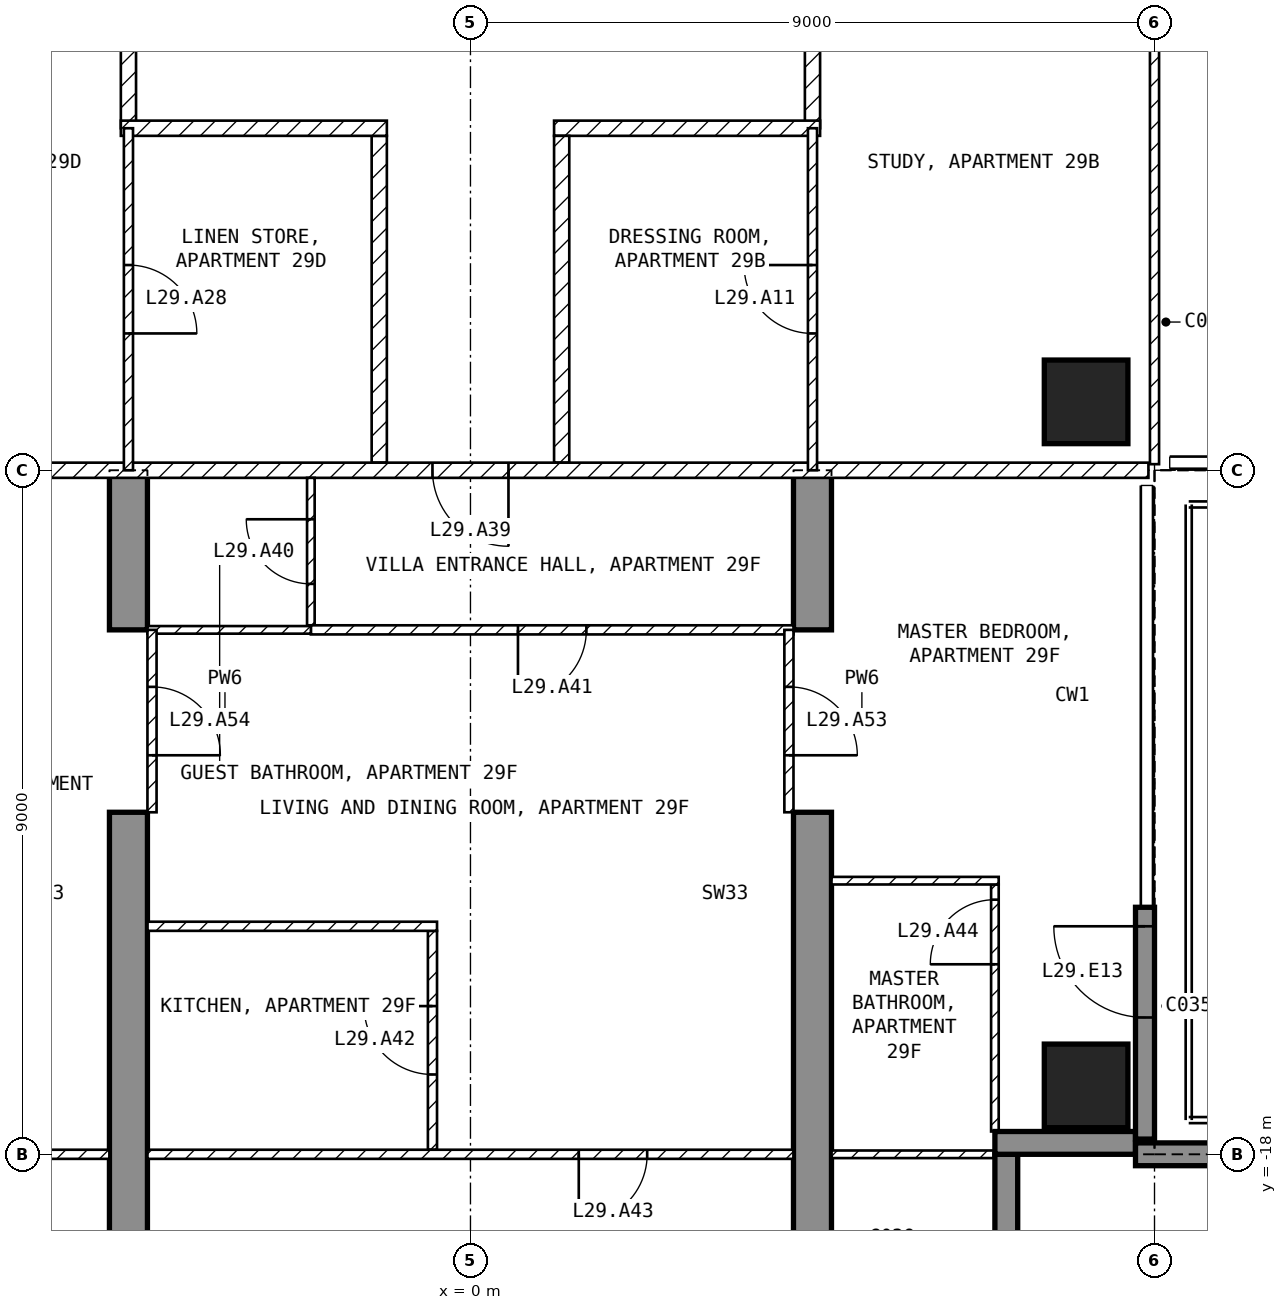
"""IFC4 building model, lengths in metres.
Left out: names, types, materials, properties, quantities, classifications, styles, units other than length and angle.
Written with IfcOpenShell. Run it as: python <this file> out.ifc"""

import sys

from ifc_helpers import new_model, si_unit, direction, frame, frame_2d, origin, origin_2d, place, context, subcontext, project, spatial, polyline, rectangle, outline, extrude, element, fill, save


model = new_model("IFC4")
c1 = context("Model", 3, precision=1e-05, world=origin(), true_north=direction((0.0, 1.0)))
c2 = subcontext(c1, "Body", "Model", "MODEL_VIEW")
j1 = project(units=[si_unit("LENGTHUNIT", "METRE"), si_unit("PLANEANGLEUNIT", "RADIAN")], contexts=[c1])
p1 = place(None, origin())
s1 = spatial("IfcSite", under=j1, at=p1, CompositionType="ELEMENT")
p2 = place(p1, origin())
s2 = spatial("IfcBuilding", under=s1, at=p2, CompositionType="ELEMENT")
p3 = place(p2, frame((0.0, 0.0, 123.4)))
s3 = spatial("IfcBuildingStorey", under=s2, at=p3, CompositionType="ELEMENT", Elevation=123.4)
for number, where, z_axis, x_axis in (
    (1, (8.1, -17.1, -0.25), (0.0, 0.0, 1.0), (1.0, 0.0, 0.0)),
    (2, (8.1, -8.1, -0.25), (0.0, 0.0, 1.0), (1.0, 0.0, 0.0)),
):
    element("IfcColumn", number, at=place(p3, frame(where, z_axis=z_axis, x_axis=x_axis)), inside=s3, PredefinedType="COLUMN", context=c2, shape_type="SweptSolid", body=[
        extrude(rectangle(XDim=1.1, YDim=1.1, at=origin_2d()), origin(), (0.0, 0.0, 1.0), 3.5),
    ])
for number, where, z_axis, x_axis in (
    (3, (-4.75, -20.15, -0.25), (1.0, 0.0, 0.0), (0.0, 1.0, 0.0)),
    (4, (4.25, -20.15, -0.25), (1.0, 0.0, 0.0), (0.0, 1.0, 0.0)),
):
    element("IfcWall", number, at=place(p3, frame(where, z_axis=z_axis, x_axis=x_axis)), inside=s3, PredefinedType="SHEAR", context=c2, shape_type="SweptSolid", body=[
        extrude(outline(polyline([(0.0, 0.0), (6.65, 0.0), (6.65, 2.65), (9.05, 2.65), (9.05, 0.0), (11.15, 0.0), (11.15, 3.5), (0.0, 3.5), (0.0, 0.0)])), origin(), (0.0, 0.0, 1.0), 0.5),
    ])
p4 = place(p3, frame((8.875, -17.8, 0.0), z_axis=(0.0, 0.0, 1.0), x_axis=(0.0, 1.0, 0.0)))
e5 = element("IfcWall", 5, at=p4, inside=s3, PredefinedType="SOLIDWALL", context=c2, shape_type="SweptSolid", body=[
    extrude(rectangle(XDim=3.05, YDim=0.25, at=frame_2d((1.525, 0.0))), origin(), (0.0, 0.0, 1.0), 3.25),
])
p5 = place(p4, frame((1.6, 0.0, 0.0)))
e6 = element("IfcOpeningElement", 6, at=p5, cuts=e5, PredefinedType="OPENING", context=c2, shape_type="SweptSolid", body=[
    extrude(rectangle(XDim=1.2, YDim=2.4, at=frame_2d((0.6, 1.2))), frame((0.0, 0.135, 0.0), z_axis=(0.0, -1.0, 0.0), x_axis=(1.0, 0.0, 0.0)), (0.0, 0.0, 1.0), 0.27),
])
p6 = place(p3, frame((7.05, -19.8, 0.0), z_axis=(0.0, 0.0, 1.0), x_axis=(0.0, 1.0, 0.0)))
e7 = element("IfcWall", 7, at=p6, inside=s3, PredefinedType="SOLIDWALL", context=c2, shape_type="SweptSolid", body=[
    extrude(rectangle(XDim=1.8, YDim=0.3, at=frame_2d((0.9, 0.0))), origin(), (0.0, 0.0, 1.0), 3.25),
])
p7 = place(p3, frame((6.9, -17.85, 0.0), z_axis=(0.0, 0.0, 1.0), x_axis=(1.0, 0.0, 0.0)))
e8 = element("IfcWall", 8, at=p7, inside=s3, PredefinedType="SOLIDWALL", context=c2, shape_type="SweptSolid", body=[
    extrude(rectangle(XDim=1.85, YDim=0.3, at=frame_2d((0.925, 0.0))), origin(), (0.0, 0.0, 1.0), 3.25),
])
p8 = place(p3, frame((8.75, -18.0, 0.0), z_axis=(0.0, 0.0, 1.0), x_axis=(1.0, 0.0, 0.0)))
e9 = element("IfcWall", 9, at=p8, inside=s3, PredefinedType="SOLIDWALL", context=c2, shape_type="SweptSolid", body=[
    extrude(rectangle(XDim=2.99, YDim=0.3, at=frame_2d((1.495, 0.0))), origin(), (0.0, 0.0, 1.0), 3.25),
])
p9 = place(p3, frame((4.5, -1.3, 0.0), z_axis=(0.0, 0.0, 1.0), x_axis=(0.0, -1.0, 0.0)))
e10 = element("IfcWall", 10, at=p9, inside=s3, PredefinedType="PARTITIONING", context=c2, shape_type="SweptSolid", body=[
    extrude(rectangle(XDim=3.2, YDim=0.2, at=frame_2d((1.6, 0.0))), origin(), (0.0, 0.0, 1.0), 3.25),
])
p10 = place(p3, frame((4.6, -4.5, 0.0), z_axis=(0.0, 0.0, 1.0), x_axis=(-1.0, 0.0, 0.0)))
e11 = element("IfcWall", 11, at=p10, inside=s3, PredefinedType="PARTITIONING", context=c2, shape_type="SweptSolid", body=[
    extrude(rectangle(XDim=3.5, YDim=0.2, at=frame_2d((1.75, 0.0))), origin(), (0.0, 0.0, 1.0), 3.25),
])
p11 = place(p3, frame((1.2, -4.6, 0.0), z_axis=(0.0, 0.0, 1.0), x_axis=(0.0, -1.0, 0.0)))
e12 = element("IfcWall", 12, at=p11, inside=s3, PredefinedType="PARTITIONING", context=c2, shape_type="SweptSolid", body=[
    extrude(rectangle(XDim=4.3, YDim=0.2, at=frame_2d((2.15, 0.0))), origin(), (0.0, 0.0, 1.0), 3.25),
])
p12 = place(p3, frame((-4.5, -4.5, 0.0), z_axis=(0.0, 0.0, 1.0), x_axis=(0.0, 1.0, 0.0)))
e13 = element("IfcWall", 13, at=p12, inside=s3, PredefinedType="PARTITIONING", context=c2, shape_type="SweptSolid", body=[
    extrude(rectangle(XDim=3.2, YDim=0.2, at=frame_2d((1.6, 0.0))), origin(), (0.0, 0.0, 1.0), 3.25),
])
p13 = place(p3, frame((-1.2, -8.9, 0.0), z_axis=(0.0, 0.0, 1.0), x_axis=(0.0, 1.0, 0.0)))
e14 = element("IfcWall", 14, at=p13, inside=s3, PredefinedType="PARTITIONING", context=c2, shape_type="SweptSolid", body=[
    extrude(rectangle(XDim=4.3, YDim=0.2, at=frame_2d((2.15, 0.0))), origin(), (0.0, 0.0, 1.0), 3.25),
])
p14 = place(p3, frame((-1.1, -4.5, 0.0), z_axis=(0.0, 0.0, 1.0), x_axis=(-1.0, 0.0, 0.0)))
e15 = element("IfcWall", 15, at=p14, inside=s3, PredefinedType="PARTITIONING", context=c2, shape_type="SweptSolid", body=[
    extrude(rectangle(XDim=3.5, YDim=0.2, at=frame_2d((1.75, 0.0))), origin(), (0.0, 0.0, 1.0), 3.25),
])
p15 = place(p3, frame((8.92, -9.0, 0.0), z_axis=(0.0, 0.0, 1.0), x_axis=(-1.0, 0.0, 0.0)))
e16 = element("IfcWall", 16, at=p15, inside=s3, PredefinedType="PARTITIONING", context=c2, shape_type="SweptSolid", body=[
    extrude(rectangle(XDim=17.84, YDim=0.2, at=frame_2d((8.92, 0.0))), origin(), (0.0, 0.0, 1.0), 3.25),
])
p16 = place(p15, frame((8.42, 0.0, 0.0)))
e17 = element("IfcOpeningElement", 17, at=p16, cuts=e16, PredefinedType="OPENING", context=c2, shape_type="SweptSolid", body=[
    extrude(rectangle(XDim=1.0, YDim=2.1, at=frame_2d((0.5, 1.05))), frame((0.0, 0.11, 0.0), z_axis=(0.0, -1.0, 0.0), x_axis=(1.0, 0.0, 0.0)), (0.0, 0.0, 1.0), 0.22),
])
p17 = place(p3, frame((9.0, -8.92, 0.0), z_axis=(0.0, 0.0, 1.0), x_axis=(0.0, 1.0, 0.0)))
e18 = element("IfcWall", 18, at=p17, inside=s3, PredefinedType="PARTITIONING", context=c2, shape_type="SweptSolid", body=[
    extrude(rectangle(XDim=7.62, YDim=0.12, at=frame_2d((3.81, 0.0))), origin(), (0.0, 0.0, 1.0), 3.25),
])
p18 = place(p17, frame((6.32, 0.0, 0.0)))
e19 = element("IfcOpeningElement", 19, at=p18, cuts=e18, PredefinedType="OPENING", context=c2, shape_type="SweptSolid", body=[
    extrude(rectangle(XDim=0.9, YDim=2.1, at=frame_2d((0.45, 1.05))), frame((0.0, 0.07, 0.0), z_axis=(0.0, -1.0, 0.0), x_axis=(1.0, 0.0, 0.0)), (0.0, 0.0, 1.0), 0.14),
])
p19 = place(p3, frame((4.5, -9.0, 0.0), z_axis=(0.0, 0.0, 1.0), x_axis=(0.0, 1.0, 0.0)))
e20 = element("IfcWall", 20, at=p19, inside=s3, PredefinedType="PARTITIONING", context=c2, shape_type="SweptSolid", body=[
    extrude(rectangle(XDim=4.5, YDim=0.12, at=frame_2d((2.25, 0.0))), origin(), (0.0, 0.0, 1.0), 3.25),
])
p20 = place(p19, frame((1.8, 0.0, 0.0)))
e21 = element("IfcOpeningElement", 21, at=p20, cuts=e20, PredefinedType="OPENING", context=c2, shape_type="SweptSolid", body=[
    extrude(rectangle(XDim=0.9, YDim=2.1, at=frame_2d((0.45, 1.05))), frame((0.0, 0.07, 0.0), z_axis=(0.0, -1.0, 0.0), x_axis=(1.0, 0.0, 0.0)), (0.0, 0.0, 1.0), 0.14),
])
p21 = place(p3, frame((-4.5, -4.5, 0.0), z_axis=(0.0, 0.0, 1.0), x_axis=(0.0, -1.0, 0.0)))
e22 = element("IfcWall", 22, at=p21, inside=s3, PredefinedType="PARTITIONING", context=c2, shape_type="SweptSolid", body=[
    extrude(rectangle(XDim=4.5, YDim=0.12, at=frame_2d((2.25, 0.0))), origin(), (0.0, 0.0, 1.0), 3.25),
])
p22 = place(p21, frame((1.8, 0.0, 0.0)))
e23 = element("IfcOpeningElement", 23, at=p22, cuts=e22, PredefinedType="OPENING", context=c2, shape_type="SweptSolid", body=[
    extrude(rectangle(XDim=0.9, YDim=2.1, at=frame_2d((0.45, 1.05))), frame((0.0, 0.07, 0.0), z_axis=(0.0, -1.0, 0.0), x_axis=(1.0, 0.0, 0.0)), (0.0, 0.0, 1.0), 0.14),
])
p23 = place(p3, frame((-2.1, -11.04, 0.0), z_axis=(0.0, 0.0, 1.0), x_axis=(0.0, 1.0, 0.0)))
e24 = element("IfcWall", 24, at=p23, inside=s3, PredefinedType="PARTITIONING", context=c2, shape_type="SweptSolid", body=[
    extrude(rectangle(XDim=1.94, YDim=0.1, at=frame_2d((0.97, 0.0))), origin(), (0.0, 0.0, 1.0), 3.25),
])
p24 = place(p23, frame((0.545, 0.0, 0.0)))
e25 = element("IfcOpeningElement", 25, at=p24, cuts=e24, PredefinedType="OPENING", context=c2, shape_type="SweptSolid", body=[
    extrude(rectangle(XDim=0.85, YDim=2.1, at=frame_2d((0.425, 1.05))), frame((0.0, 0.06, 0.0), z_axis=(0.0, -1.0, 0.0), x_axis=(1.0, 0.0, 0.0)), (0.0, 0.0, 1.0), 0.12),
])
p25 = place(p3, frame((4.25, -11.1, 0.0), z_axis=(0.0, 0.0, 1.0), x_axis=(-1.0, 0.0, 0.0)))
e26 = element("IfcWall", 26, at=p25, inside=s3, PredefinedType="PARTITIONING", context=c2, shape_type="SweptSolid", body=[
    extrude(rectangle(XDim=6.35, YDim=0.12, at=frame_2d((3.175, 0.0))), origin(), (0.0, 0.0, 1.0), 3.25),
])
p26 = place(p25, frame((2.725, 0.0, 0.0)))
e27 = element("IfcOpeningElement", 27, at=p26, cuts=e26, PredefinedType="OPENING", context=c2, shape_type="SweptSolid", body=[
    extrude(rectangle(XDim=0.9, YDim=2.1, at=frame_2d((0.45, 1.05))), frame((0.0, 0.07, 0.0), z_axis=(0.0, -1.0, 0.0), x_axis=(1.0, 0.0, 0.0)), (0.0, 0.0, 1.0), 0.14),
])
p27 = place(p3, frame((-2.1, -11.1, 0.0), z_axis=(0.0, 0.0, 1.0), x_axis=(-1.0, 0.0, 0.0)))
e28 = element("IfcWall", 28, at=p27, inside=s3, PredefinedType="PARTITIONING", context=c2, shape_type="SweptSolid", body=[
    extrude(rectangle(XDim=2.15, YDim=0.1, at=frame_2d((1.075, 0.0))), origin(), (0.0, 0.0, 1.0), 3.25),
])
p28 = place(p3, frame((-0.5, -17.94, 0.0), z_axis=(0.0, 0.0, 1.0), x_axis=(0.0, 1.0, 0.0)))
e29 = element("IfcWall", 29, at=p28, inside=s3, PredefinedType="PARTITIONING", context=c2, shape_type="SweptSolid", body=[
    extrude(rectangle(XDim=2.88, YDim=0.12, at=frame_2d((1.44, 0.0))), origin(), (0.0, 0.0, 1.0), 3.25),
])
p29 = place(p28, frame((0.99, 0.0, 0.0)))
e30 = element("IfcOpeningElement", 30, at=p29, cuts=e29, PredefinedType="OPENING", context=c2, shape_type="SweptSolid", body=[
    extrude(rectangle(XDim=0.9, YDim=2.1, at=frame_2d((0.45, 1.05))), frame((0.0, 0.07, 0.0), z_axis=(0.0, -1.0, 0.0), x_axis=(1.0, 0.0, 0.0)), (0.0, 0.0, 1.0), 0.14),
])
p30 = place(p3, frame((-0.44, -15.0, 0.0), z_axis=(0.0, 0.0, 1.0), x_axis=(-1.0, 0.0, 0.0)))
e31 = element("IfcWall", 31, at=p30, inside=s3, PredefinedType="PARTITIONING", context=c2, shape_type="SweptSolid", body=[
    extrude(rectangle(XDim=3.81, YDim=0.12, at=frame_2d((1.905, 0.0))), origin(), (0.0, 0.0, 1.0), 3.25),
])
p31 = place(p3, frame((4.25, -18.0, 0.0), z_axis=(0.0, 0.0, 1.0), x_axis=(-1.0, 0.0, 0.0)))
e32 = element("IfcWall", 32, at=p31, inside=s3, PredefinedType="PARTITIONING", context=c2, shape_type="SweptSolid", body=[
    extrude(rectangle(XDim=8.5, YDim=0.12, at=frame_2d((4.25, 0.0))), origin(), (0.0, 0.0, 1.0), 3.25),
])
p32 = place(p31, frame((1.925, 0.0, 0.0)))
e33 = element("IfcOpeningElement", 33, at=p32, cuts=e32, PredefinedType="OPENING", context=c2, shape_type="SweptSolid", body=[
    extrude(rectangle(XDim=0.9, YDim=2.1, at=frame_2d((0.45, 1.05))), frame((0.0, 0.07, 0.0), z_axis=(0.0, -1.0, 0.0), x_axis=(1.0, 0.0, 0.0)), (0.0, 0.0, 1.0), 0.14),
])
p33 = place(p3, frame((6.9, -17.7, 0.0), z_axis=(0.0, 0.0, 1.0), x_axis=(0.0, 1.0, 0.0)))
e34 = element("IfcWall", 34, at=p33, inside=s3, PredefinedType="PARTITIONING", context=c2, shape_type="SweptSolid", body=[
    extrude(rectangle(XDim=3.25, YDim=0.1, at=frame_2d((1.625, 0.0))), origin(), (0.0, 0.0, 1.0), 3.25),
])
p34 = place(p33, frame((2.2, 0.0, 0.0)))
e35 = element("IfcOpeningElement", 35, at=p34, cuts=e34, PredefinedType="OPENING", context=c2, shape_type="SweptSolid", body=[
    extrude(rectangle(XDim=0.85, YDim=2.1, at=frame_2d((0.425, 1.05))), frame((0.0, 0.06, 0.0), z_axis=(0.0, -1.0, 0.0), x_axis=(1.0, 0.0, 0.0)), (0.0, 0.0, 1.0), 0.12),
])
p35 = place(p3, frame((6.95, -14.4, 0.0), z_axis=(0.0, 0.0, 1.0), x_axis=(-1.0, 0.0, 0.0)))
e36 = element("IfcWall", 36, at=p35, inside=s3, PredefinedType="PARTITIONING", context=c2, shape_type="SweptSolid", body=[
    extrude(rectangle(XDim=2.2, YDim=0.1, at=frame_2d((1.1, 0.0))), origin(), (0.0, 0.0, 1.0), 3.25),
])
p36 = place(p3, frame((7.12, -18.0, 0.0), z_axis=(0.0, 0.0, 1.0), x_axis=(-1.0, 0.0, 0.0)))
e37 = element("IfcWall", 37, at=p36, inside=s3, PredefinedType="PARTITIONING", context=c2, shape_type="SweptSolid", body=[
    extrude(rectangle(XDim=2.37, YDim=0.1, at=frame_2d((1.185, 0.0))), origin(), (0.0, 0.0, 1.0), 3.25),
])
p37 = place(p3, frame((-4.75, -18.0, 0.0), z_axis=(0.0, 0.0, 1.0), x_axis=(-1.0, 0.0, 0.0)))
e38 = element("IfcWall", 38, at=p37, inside=s3, PredefinedType="PARTITIONING", context=c2, shape_type="SweptSolid", body=[
    extrude(rectangle(XDim=2.37, YDim=0.12, at=frame_2d((1.185, 0.0))), origin(), (0.0, 0.0, 1.0), 3.25),
])
p38 = place(p3, frame((4.19, -11.1, 0.0), z_axis=(0.0, 0.0, 1.0), x_axis=(0.0, -1.0, 0.0)))
e39 = element("IfcWall", 39, at=p38, inside=s3, PredefinedType="PARTITIONING", context=c2, shape_type="SweptSolid", body=[
    extrude(rectangle(XDim=2.4, YDim=0.12, at=frame_2d((1.2, 0.0))), origin(), (0.0, 0.0, 1.0), 2.4),
])
p39 = place(p38, frame((0.75, 0.0, 0.0)))
e40 = element("IfcOpeningElement", 40, at=p39, cuts=e39, PredefinedType="OPENING", context=c2, shape_type="SweptSolid", body=[
    extrude(rectangle(XDim=0.9, YDim=2.1, at=frame_2d((0.45, 1.05))), frame((0.0, 0.07, 0.0), z_axis=(0.0, -1.0, 0.0), x_axis=(1.0, 0.0, 0.0)), (0.0, 0.0, 1.0), 0.14),
])
p40 = place(p3, frame((-4.19, -11.1, 0.0), z_axis=(0.0, 0.0, 1.0), x_axis=(0.0, -1.0, 0.0)))
e41 = element("IfcWall", 41, at=p40, inside=s3, PredefinedType="PARTITIONING", context=c2, shape_type="SweptSolid", body=[
    extrude(rectangle(XDim=2.4, YDim=0.12, at=frame_2d((1.2, 0.0))), origin(), (0.0, 0.0, 1.0), 2.4),
])
p41 = place(p40, frame((0.75, 0.0, 0.0)))
e42 = element("IfcOpeningElement", 42, at=p41, cuts=e41, PredefinedType="OPENING", context=c2, shape_type="SweptSolid", body=[
    extrude(rectangle(XDim=0.9, YDim=2.1, at=frame_2d((0.45, 1.05))), frame((0.0, 0.07, 0.0), z_axis=(0.0, -1.0, 0.0), x_axis=(1.0, 0.0, 0.0)), (0.0, 0.0, 1.0), 0.14),
])
p42 = place(p5, origin())
e43 = element("IfcDoor", 43, at=p42, inside=s3, OperationType="SINGLE_SWING_RIGHT", PredefinedType="DOOR", context=c2, shape_type="SweptSolid", body=[
    extrude(rectangle(XDim=1.2, YDim=2.4, at=frame_2d((0.6, 1.2))), frame((0.0, 0.025, 0.0), z_axis=(0.0, -1.0, 0.0), x_axis=(1.0, 0.0, 0.0)), (0.0, 0.0, 1.0), 0.05),
])
fill(e6, e43)
p43 = place(p20, origin())
e44 = element("IfcDoor", 44, at=p43, inside=s3, OperationType="SINGLE_SWING_RIGHT", PredefinedType="DOOR", context=c2, shape_type="SweptSolid", body=[
    extrude(rectangle(XDim=0.9, YDim=2.1, at=frame_2d((0.45, 1.05))), frame((0.0, 0.025, 0.0), z_axis=(0.0, -1.0, 0.0), x_axis=(1.0, 0.0, 0.0)), (0.0, 0.0, 1.0), 0.05),
])
fill(e21, e44)
p44 = place(p22, origin())
e45 = element("IfcDoor", 45, at=p44, inside=s3, OperationType="SINGLE_SWING_RIGHT", PredefinedType="DOOR", context=c2, shape_type="SweptSolid", body=[
    extrude(rectangle(XDim=0.9, YDim=2.1, at=frame_2d((0.45, 1.05))), frame((0.0, 0.025, 0.0), z_axis=(0.0, -1.0, 0.0), x_axis=(1.0, 0.0, 0.0)), (0.0, 0.0, 1.0), 0.05),
])
fill(e23, e45)
p45 = place(p16, origin())
e46 = element("IfcDoor", 46, at=p45, inside=s3, OperationType="SINGLE_SWING_LEFT", PredefinedType="DOOR", context=c2, shape_type="SweptSolid", body=[
    extrude(rectangle(XDim=1.0, YDim=2.1, at=frame_2d((0.5, 1.05))), frame((0.0, 0.025, 0.0), z_axis=(0.0, -1.0, 0.0), x_axis=(1.0, 0.0, 0.0)), (0.0, 0.0, 1.0), 0.05),
])
fill(e17, e46)
p46 = place(p24, origin())
e47 = element("IfcDoor", 47, at=p46, inside=s3, OperationType="SINGLE_SWING_RIGHT", PredefinedType="DOOR", context=c2, shape_type="SweptSolid", body=[
    extrude(rectangle(XDim=0.85, YDim=2.1, at=frame_2d((0.425, 1.05))), frame((0.0, 0.025, 0.0), z_axis=(0.0, -1.0, 0.0), x_axis=(1.0, 0.0, 0.0)), (0.0, 0.0, 1.0), 0.05),
])
fill(e25, e47)
p47 = place(p26, origin())
e48 = element("IfcDoor", 48, at=p47, inside=s3, OperationType="SINGLE_SWING_RIGHT", PredefinedType="DOOR", context=c2, shape_type="SweptSolid", body=[
    extrude(rectangle(XDim=0.9, YDim=2.1, at=frame_2d((0.45, 1.05))), frame((0.0, 0.025, 0.0), z_axis=(0.0, -1.0, 0.0), x_axis=(1.0, 0.0, 0.0)), (0.0, 0.0, 1.0), 0.05),
])
fill(e27, e48)
p48 = place(p29, origin())
e49 = element("IfcDoor", 49, at=p48, inside=s3, OperationType="SINGLE_SWING_RIGHT", PredefinedType="DOOR", context=c2, shape_type="SweptSolid", body=[
    extrude(rectangle(XDim=0.9, YDim=2.1, at=frame_2d((0.45, 1.05))), frame((0.0, 0.025, 0.0), z_axis=(0.0, -1.0, 0.0), x_axis=(1.0, 0.0, 0.0)), (0.0, 0.0, 1.0), 0.05),
])
fill(e30, e49)
p49 = place(p32, origin())
e50 = element("IfcDoor", 50, at=p49, inside=s3, OperationType="SINGLE_SWING_RIGHT", PredefinedType="DOOR", context=c2, shape_type="SweptSolid", body=[
    extrude(rectangle(XDim=0.9, YDim=2.1, at=frame_2d((0.45, 1.05))), frame((0.0, 0.025, 0.0), z_axis=(0.0, -1.0, 0.0), x_axis=(1.0, 0.0, 0.0)), (0.0, 0.0, 1.0), 0.05),
])
fill(e33, e50)
p50 = place(p34, origin())
e51 = element("IfcDoor", 51, at=p50, inside=s3, OperationType="SINGLE_SWING_LEFT", PredefinedType="DOOR", context=c2, shape_type="SweptSolid", body=[
    extrude(rectangle(XDim=0.85, YDim=2.1, at=frame_2d((0.425, 1.05))), frame((0.0, 0.025, 0.0), z_axis=(0.0, -1.0, 0.0), x_axis=(1.0, 0.0, 0.0)), (0.0, 0.0, 1.0), 0.05),
])
fill(e35, e51)
p51 = place(p39, origin())
e52 = element("IfcDoor", 52, at=p51, inside=s3, OperationType="SINGLE_SWING_RIGHT", PredefinedType="DOOR", context=c2, shape_type="SweptSolid", body=[
    extrude(rectangle(XDim=0.9, YDim=2.1, at=frame_2d((0.45, 1.05))), frame((0.0, 0.025, 0.0), z_axis=(0.0, -1.0, 0.0), x_axis=(1.0, 0.0, 0.0)), (0.0, 0.0, 1.0), 0.05),
])
fill(e40, e52)
p52 = place(p41, origin())
e53 = element("IfcDoor", 53, at=p52, inside=s3, OperationType="SINGLE_SWING_RIGHT", PredefinedType="DOOR", context=c2, shape_type="SweptSolid", body=[
    extrude(rectangle(XDim=0.9, YDim=2.1, at=frame_2d((0.45, 1.05))), frame((0.0, 0.025, 0.0), z_axis=(0.0, -1.0, 0.0), x_axis=(1.0, 0.0, 0.0)), (0.0, 0.0, 1.0), 0.05),
])
fill(e42, e53)
save(model, sys.argv[1])
